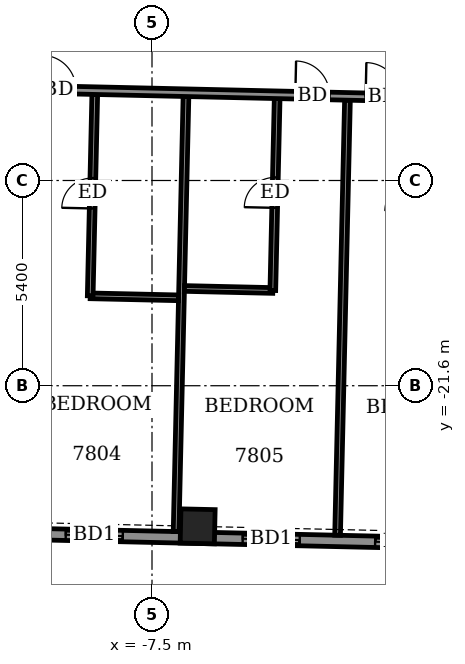
"""IFC4 building model, lengths in metres.
Left out: names, types, materials, properties, quantities, classifications, styles, units other than length and angle.
Written with IfcOpenShell. Run it as: python <this file> out.ifc"""

import sys

from ifc_helpers import new_model, si_unit, direction, frame, frame_2d, origin, origin_2d, place, context, subcontext, project, spatial, rectangle, extrude, element, fill, save


model = new_model("IFC4")
c1 = context("Model", 3, precision=1e-05, world=origin(), true_north=direction((0.0, 1.0)))
c2 = subcontext(c1, "Body", "Model", "MODEL_VIEW")
j1 = project(units=[si_unit("LENGTHUNIT", "METRE"), si_unit("PLANEANGLEUNIT", "RADIAN")], contexts=[c1])
p1 = place(None, origin())
s1 = spatial("IfcSite", under=j1, at=p1, CompositionType="ELEMENT")
p2 = place(p1, origin())
s2 = spatial("IfcBuilding", under=s1, at=p2, CompositionType="ELEMENT")
p3 = place(p2, frame((0.0, 0.0, 306.1)))
s3 = spatial("IfcBuildingStorey", under=s2, at=p3, CompositionType="ELEMENT", Elevation=306.1)
p4 = place(p3, frame((-6.299, -25.3, -0.55), z_axis=(0.0, 0.0, 1.0), x_axis=(0.999743338971, -0.022655157973, 0.0)))
e1 = element("IfcColumn", 1, at=p4, inside=s3, PredefinedType="COLUMN", context=c2, shape_type="SweptSolid", body=[
    extrude(rectangle(XDim=0.9, YDim=0.9, at=origin_2d()), origin(), (0.0, 0.0, 1.0), 3.6),
])
p5 = place(p3, frame((-28.264, -25.102, 0.0), z_axis=(0.0, 0.0, 1.0), x_axis=(0.999742520573, -0.022691244094, 0.0)))
e2 = element("IfcWall", 2, at=p5, inside=s3, PredefinedType="SOLIDWALL", context=c2, shape_type="SweptSolid", body=[
    extrude(rectangle(XDim=51.3, YDim=0.3, at=frame_2d((25.65, 0.0))), origin(), (0.0, 0.0, 1.0), 2.5),
])
p6 = place(p5, frame((1.654, 0.0, 0.0)))
e3 = element("IfcOpeningElement", 3, at=p6, cuts=e2, PredefinedType="OPENING", context=c2, shape_type="SweptSolid", body=[
    extrude(rectangle(XDim=1.5, YDim=2.4, at=frame_2d((0.75, 1.2))), frame((0.0, 0.16, 0.0), z_axis=(0.0, -1.0, 0.0), x_axis=(1.0, 0.0, 0.0)), (0.0, 0.0, 1.0), 0.32),
])
p7 = place(p5, frame((4.936, 0.0, 0.0)))
e4 = element("IfcOpeningElement", 4, at=p7, cuts=e2, PredefinedType="OPENING", context=c2, shape_type="SweptSolid", body=[
    extrude(rectangle(XDim=1.5, YDim=2.4, at=frame_2d((0.75, 1.2))), frame((0.0, 0.16, 0.0), z_axis=(0.0, -1.0, 0.0), x_axis=(1.0, 0.0, 0.0)), (0.0, 0.0, 1.0), 0.32),
])
p8 = place(p5, frame((9.975, 0.0, 0.0)))
e5 = element("IfcOpeningElement", 5, at=p8, cuts=e2, PredefinedType="OPENING", context=c2, shape_type="SweptSolid", body=[
    extrude(rectangle(XDim=1.5, YDim=2.4, at=frame_2d((0.75, 1.2))), frame((0.0, 0.16, 0.0), z_axis=(0.0, -1.0, 0.0), x_axis=(1.0, 0.0, 0.0)), (0.0, 0.0, 1.0), 0.32),
])
p9 = place(p5, frame((15.196, 0.0, 0.0)))
e6 = element("IfcOpeningElement", 6, at=p9, cuts=e2, PredefinedType="OPENING", context=c2, shape_type="SweptSolid", body=[
    extrude(rectangle(XDim=1.5, YDim=2.4, at=frame_2d((0.75, 1.2))), frame((0.0, 0.16, 0.0), z_axis=(0.0, -1.0, 0.0), x_axis=(1.0, 0.0, 0.0)), (0.0, 0.0, 1.0), 0.32),
])
p10 = place(p5, frame((18.5, 0.0, 0.0)))
e7 = element("IfcOpeningElement", 7, at=p10, cuts=e2, PredefinedType="OPENING", context=c2, shape_type="SweptSolid", body=[
    extrude(rectangle(XDim=1.5, YDim=2.4, at=frame_2d((0.75, 1.2))), frame((0.0, 0.16, 0.0), z_axis=(0.0, -1.0, 0.0), x_axis=(1.0, 0.0, 0.0)), (0.0, 0.0, 1.0), 0.32),
])
p11 = place(p5, frame((23.157, 0.0, 0.0)))
e8 = element("IfcOpeningElement", 8, at=p11, cuts=e2, PredefinedType="OPENING", context=c2, shape_type="SweptSolid", body=[
    extrude(rectangle(XDim=1.5, YDim=2.4, at=frame_2d((0.75, 1.2))), frame((0.0, 0.16, 0.0), z_axis=(0.0, -1.0, 0.0), x_axis=(1.0, 0.0, 0.0)), (0.0, 0.0, 1.0), 0.32),
])
p12 = place(p5, frame((26.643, 0.0, 0.0)))
e9 = element("IfcOpeningElement", 9, at=p12, cuts=e2, PredefinedType="OPENING", context=c2, shape_type="SweptSolid", body=[
    extrude(rectangle(XDim=1.5, YDim=2.4, at=frame_2d((0.75, 1.2))), frame((0.0, 0.16, 0.0), z_axis=(0.0, -1.0, 0.0), x_axis=(1.0, 0.0, 0.0)), (0.0, 0.0, 1.0), 0.32),
])
p13 = place(p5, frame((31.275, 0.0, 0.0)))
e10 = element("IfcOpeningElement", 10, at=p13, cuts=e2, PredefinedType="OPENING", context=c2, shape_type="SweptSolid", body=[
    extrude(rectangle(XDim=1.5, YDim=2.4, at=frame_2d((0.75, 1.2))), frame((0.0, 0.16, 0.0), z_axis=(0.0, -1.0, 0.0), x_axis=(1.0, 0.0, 0.0)), (0.0, 0.0, 1.0), 0.32),
])
p14 = place(p5, frame((34.578, 0.0, 0.0)))
e11 = element("IfcOpeningElement", 11, at=p14, cuts=e2, PredefinedType="OPENING", context=c2, shape_type="SweptSolid", body=[
    extrude(rectangle(XDim=1.5, YDim=2.4, at=frame_2d((0.75, 1.2))), frame((0.0, 0.16, 0.0), z_axis=(0.0, -1.0, 0.0), x_axis=(1.0, 0.0, 0.0)), (0.0, 0.0, 1.0), 0.32),
])
p15 = place(p5, frame((39.75, 0.0, 0.0)))
e12 = element("IfcOpeningElement", 12, at=p15, cuts=e2, PredefinedType="OPENING", context=c2, shape_type="SweptSolid", body=[
    extrude(rectangle(XDim=1.5, YDim=2.4, at=frame_2d((0.75, 1.2))), frame((0.0, 0.16, 0.0), z_axis=(0.0, -1.0, 0.0), x_axis=(1.0, 0.0, 0.0)), (0.0, 0.0, 1.0), 0.32),
])
p16 = place(p5, frame((44.839, 0.0, 0.0)))
e13 = element("IfcOpeningElement", 13, at=p16, cuts=e2, PredefinedType="OPENING", context=c2, shape_type="SweptSolid", body=[
    extrude(rectangle(XDim=1.5, YDim=2.4, at=frame_2d((0.75, 1.2))), frame((0.0, 0.16, 0.0), z_axis=(0.0, -1.0, 0.0), x_axis=(1.0, 0.0, 0.0)), (0.0, 0.0, 1.0), 0.32),
])
p17 = place(p5, frame((47.628, 0.0, 0.9)))
e14 = element("IfcOpeningElement", 14, at=p17, cuts=e2, PredefinedType="OPENING", context=c2, shape_type="SweptSolid", body=[
    extrude(rectangle(XDim=2.4, YDim=1.5, at=frame_2d((1.2, 0.75))), frame((0.0, 0.16, 0.0), z_axis=(0.0, -1.0, 0.0), x_axis=(1.0, 0.0, 0.0)), (0.0, 0.0, 1.0), 0.32),
])
p18 = place(p3, frame((-6.866, -25.438, 0.0), z_axis=(0.0, 0.0, 1.0), x_axis=(0.022706391805, 0.999742176649, 0.0)))
e15 = element("IfcWall", 15, at=p18, inside=s3, PredefinedType="PARTITIONING", context=c2, shape_type="SweptSolid", body=[
    extrude(rectangle(XDim=11.451, YDim=0.15, at=frame_2d((5.726, 0.0))), origin(), (0.0, 0.0, 1.0), 2.5),
])
p19 = place(p3, frame((-2.617, -25.534, 0.0), z_axis=(0.0, 0.0, 1.0), x_axis=(0.022708327922, 0.999742132674, 0.0)))
e16 = element("IfcWall", 16, at=p19, inside=s3, PredefinedType="PARTITIONING", context=c2, shape_type="SweptSolid", body=[
    extrude(rectangle(XDim=11.45, YDim=0.15, at=frame_2d((5.725, 0.0))), origin(), (0.0, 0.0, 1.0), 2.5),
])
p20 = place(p3, frame((-9.126, -19.235, 0.0), z_axis=(0.0, 0.0, 1.0), x_axis=(0.999749954681, -0.022361308448, 0.0)))
e17 = element("IfcWall", 17, at=p20, inside=s3, PredefinedType="PARTITIONING", context=c2, shape_type="SweptSolid", body=[
    extrude(rectangle(XDim=2.325, YDim=0.15, at=frame_2d((1.163, 0.0))), origin(), (0.0, 0.0, 1.0), 3.05),
])
p21 = place(p3, frame((-9.126, -19.235, 0.0), z_axis=(0.0, 0.0, 1.0), x_axis=(0.022615729912, 0.999744231672, 0.0)))
e18 = element("IfcWall", 18, at=p21, inside=s3, PredefinedType="PARTITIONING", context=c2, shape_type="SweptSolid", body=[
    extrude(rectangle(XDim=5.301, YDim=0.15, at=frame_2d((2.65, 0.0))), origin(), (0.0, 0.0, 1.0), 3.05),
])
p22 = place(p21, frame((2.3, 0.0, 0.0)))
e19 = element("IfcOpeningElement", 19, at=p22, cuts=e18, PredefinedType="OPENING", context=c2, shape_type="SweptSolid", body=[
    extrude(rectangle(XDim=0.8, YDim=2.1, at=frame_2d((0.4, 1.05))), frame((0.0, 0.085, 0.0), z_axis=(0.0, -1.0, 0.0), x_axis=(1.0, 0.0, 0.0)), (0.0, 0.0, 1.0), 0.17),
])
p23 = place(p3, frame((-6.646, -19.041, 0.0), z_axis=(0.0, 0.0, 1.0), x_axis=(0.999740478815, -0.022781023197, 0.0)))
e20 = element("IfcWall", 20, at=p23, inside=s3, PredefinedType="PARTITIONING", context=c2, shape_type="SweptSolid", body=[
    extrude(rectangle(XDim=2.325, YDim=0.15, at=frame_2d((1.163, 0.0))), origin(), (0.0, 0.0, 1.0), 3.05),
])
p24 = place(p3, frame((-4.321, -19.094, 0.0), z_axis=(0.0, 0.0, 1.0), x_axis=(0.02257535817, 0.999745144126, 0.0)))
e21 = element("IfcWall", 21, at=p24, inside=s3, PredefinedType="PARTITIONING", context=c2, shape_type="SweptSolid", body=[
    extrude(rectangle(XDim=5.05, YDim=0.15, at=frame_2d((2.525, 0.0))), origin(), (0.0, 0.0, 1.0), 3.05),
])
p25 = place(p24, frame((2.175, 0.0, 0.0)))
e22 = element("IfcOpeningElement", 22, at=p25, cuts=e21, PredefinedType="OPENING", context=c2, shape_type="SweptSolid", body=[
    extrude(rectangle(XDim=0.8, YDim=2.1, at=frame_2d((0.4, 1.05))), frame((0.0, 0.085, 0.0), z_axis=(0.0, -1.0, 0.0), x_axis=(1.0, 0.0, 0.0)), (0.0, 0.0, 1.0), 0.17),
])
p26 = place(p3, frame((-31.347, -13.329, 0.0), z_axis=(0.0, 0.0, 1.0), x_axis=(0.999742613079, -0.022687168058, 0.0)))
e23 = element("IfcWall", 23, at=p26, inside=s3, PredefinedType="PARTITIONING", context=c2, shape_type="SweptSolid", body=[
    extrude(rectangle(XDim=58.799, YDim=0.2, at=frame_2d((29.399, 0.0))), origin(), (0.0, 0.0, 1.0), 3.05),
])
p27 = place(p26, frame((1.35, 0.0, 0.0)))
e24 = element("IfcOpeningElement", 24, at=p27, cuts=e23, PredefinedType="OPENING", context=c2, shape_type="SweptSolid", body=[
    extrude(rectangle(XDim=1.0, YDim=2.1, at=frame_2d((0.5, 1.05))), frame((0.0, 0.11, 0.0), z_axis=(0.0, -1.0, 0.0), x_axis=(1.0, 0.0, 0.0)), (0.0, 0.0, 1.0), 0.22),
])
p28 = place(p26, frame((5.95, 0.0, 0.0)))
e25 = element("IfcOpeningElement", 25, at=p28, cuts=e23, PredefinedType="OPENING", context=c2, shape_type="SweptSolid", body=[
    extrude(rectangle(XDim=0.9, YDim=2.1, at=frame_2d((0.45, 1.05))), frame((0.0, 0.11, 0.0), z_axis=(0.0, -1.0, 0.0), x_axis=(1.0, 0.0, 0.0)), (0.0, 0.0, 1.0), 0.22),
])
p29 = place(p26, frame((10.575, 0.0, 0.0)))
e26 = element("IfcOpeningElement", 26, at=p29, cuts=e23, PredefinedType="OPENING", context=c2, shape_type="SweptSolid", body=[
    extrude(rectangle(XDim=0.9, YDim=2.1, at=frame_2d((0.45, 1.05))), frame((0.0, 0.11, 0.0), z_axis=(0.0, -1.0, 0.0), x_axis=(1.0, 0.0, 0.0)), (0.0, 0.0, 1.0), 0.22),
])
p30 = place(p26, frame((12.425, 0.0, 0.0)))
e27 = element("IfcOpeningElement", 27, at=p30, cuts=e23, PredefinedType="OPENING", context=c2, shape_type="SweptSolid", body=[
    extrude(rectangle(XDim=0.9, YDim=2.1, at=frame_2d((0.45, 1.05))), frame((0.0, 0.11, 0.0), z_axis=(0.0, -1.0, 0.0), x_axis=(1.0, 0.0, 0.0)), (0.0, 0.0, 1.0), 0.22),
])
p31 = place(p26, frame((19.075, 0.0, 0.0)))
e28 = element("IfcOpeningElement", 28, at=p31, cuts=e23, PredefinedType="OPENING", context=c2, shape_type="SweptSolid", body=[
    extrude(rectangle(XDim=0.9, YDim=2.1, at=frame_2d((0.45, 1.05))), frame((0.0, 0.11, 0.0), z_axis=(0.0, -1.0, 0.0), x_axis=(1.0, 0.0, 0.0)), (0.0, 0.0, 1.0), 0.22),
])
p32 = place(p26, frame((20.95, 0.0, 0.0)))
e29 = element("IfcOpeningElement", 29, at=p32, cuts=e23, PredefinedType="OPENING", context=c2, shape_type="SweptSolid", body=[
    extrude(rectangle(XDim=0.9, YDim=2.1, at=frame_2d((0.45, 1.05))), frame((0.0, 0.11, 0.0), z_axis=(0.0, -1.0, 0.0), x_axis=(1.0, 0.0, 0.0)), (0.0, 0.0, 1.0), 0.22),
])
p33 = place(p26, frame((27.625, 0.0, 0.0)))
e30 = element("IfcOpeningElement", 30, at=p33, cuts=e23, PredefinedType="OPENING", context=c2, shape_type="SweptSolid", body=[
    extrude(rectangle(XDim=0.9, YDim=2.1, at=frame_2d((0.45, 1.05))), frame((0.0, 0.11, 0.0), z_axis=(0.0, -1.0, 0.0), x_axis=(1.0, 0.0, 0.0)), (0.0, 0.0, 1.0), 0.22),
])
p34 = place(p26, frame((29.475, 0.0, 0.0)))
e31 = element("IfcOpeningElement", 31, at=p34, cuts=e23, PredefinedType="OPENING", context=c2, shape_type="SweptSolid", body=[
    extrude(rectangle(XDim=0.9, YDim=2.1, at=frame_2d((0.45, 1.05))), frame((0.0, 0.11, 0.0), z_axis=(0.0, -1.0, 0.0), x_axis=(1.0, 0.0, 0.0)), (0.0, 0.0, 1.0), 0.22),
])
p35 = place(p26, frame((36.125, 0.0, 0.0)))
e32 = element("IfcOpeningElement", 32, at=p35, cuts=e23, PredefinedType="OPENING", context=c2, shape_type="SweptSolid", body=[
    extrude(rectangle(XDim=0.9, YDim=2.1, at=frame_2d((0.45, 1.05))), frame((0.0, 0.11, 0.0), z_axis=(0.0, -1.0, 0.0), x_axis=(1.0, 0.0, 0.0)), (0.0, 0.0, 1.0), 0.22),
])
p36 = place(p26, frame((37.95, 0.0, 0.0)))
e33 = element("IfcOpeningElement", 33, at=p36, cuts=e23, PredefinedType="OPENING", context=c2, shape_type="SweptSolid", body=[
    extrude(rectangle(XDim=0.9, YDim=2.1, at=frame_2d((0.45, 1.05))), frame((0.0, 0.11, 0.0), z_axis=(0.0, -1.0, 0.0), x_axis=(1.0, 0.0, 0.0)), (0.0, 0.0, 1.0), 0.22),
])
p37 = place(p26, frame((44.6, 0.0, 0.0)))
e34 = element("IfcOpeningElement", 34, at=p37, cuts=e23, PredefinedType="OPENING", context=c2, shape_type="SweptSolid", body=[
    extrude(rectangle(XDim=0.9, YDim=2.1, at=frame_2d((0.45, 1.05))), frame((0.0, 0.11, 0.0), z_axis=(0.0, -1.0, 0.0), x_axis=(1.0, 0.0, 0.0)), (0.0, 0.0, 1.0), 0.22),
])
p38 = place(p26, frame((46.475, 0.0, 0.0)))
e35 = element("IfcOpeningElement", 35, at=p38, cuts=e23, PredefinedType="OPENING", context=c2, shape_type="SweptSolid", body=[
    extrude(rectangle(XDim=0.9, YDim=2.1, at=frame_2d((0.45, 1.05))), frame((0.0, 0.11, 0.0), z_axis=(0.0, -1.0, 0.0), x_axis=(1.0, 0.0, 0.0)), (0.0, 0.0, 1.0), 0.22),
])
p39 = place(p26, frame((55.925, 0.0, 0.0)))
e36 = element("IfcOpeningElement", 36, at=p39, cuts=e23, PredefinedType="OPENING", context=c2, shape_type="SweptSolid", body=[
    extrude(rectangle(XDim=1.0, YDim=2.1, at=frame_2d((0.5, 1.05))), frame((0.0, 0.11, 0.0), z_axis=(0.0, -1.0, 0.0), x_axis=(1.0, 0.0, 0.0)), (0.0, 0.0, 1.0), 0.22),
])
p40 = place(p26, frame((51.0, 0.0, 0.0)))
e37 = element("IfcOpeningElement", 37, at=p40, cuts=e23, PredefinedType="OPENING", context=c2, shape_type="SweptSolid", body=[
    extrude(rectangle(XDim=0.9, YDim=2.1, at=frame_2d((0.45, 1.05))), frame((0.0, 0.11, 0.0), z_axis=(0.0, -1.0, 0.0), x_axis=(1.0, 0.0, 0.0)), (0.0, 0.0, 1.0), 0.22),
])
p41 = place(p10, origin())
e38 = element("IfcDoor", 38, at=p41, inside=s3, OperationType="SLIDING_TO_LEFT", PredefinedType="DOOR", context=c2, shape_type="SweptSolid", body=[
    extrude(rectangle(XDim=1.5, YDim=2.4, at=frame_2d((0.75, 1.2))), frame((0.0, 0.025, 0.0), z_axis=(0.0, -1.0, 0.0), x_axis=(1.0, 0.0, 0.0)), (0.0, 0.0, 1.0), 0.05),
])
fill(e7, e38)
p42 = place(p11, origin())
e39 = element("IfcDoor", 39, at=p42, inside=s3, OperationType="SLIDING_TO_LEFT", PredefinedType="DOOR", context=c2, shape_type="SweptSolid", body=[
    extrude(rectangle(XDim=1.5, YDim=2.4, at=frame_2d((0.75, 1.2))), frame((0.0, 0.025, 0.0), z_axis=(0.0, -1.0, 0.0), x_axis=(1.0, 0.0, 0.0)), (0.0, 0.0, 1.0), 0.05),
])
fill(e8, e39)
p43 = place(p12, origin())
e40 = element("IfcDoor", 40, at=p43, inside=s3, OperationType="SLIDING_TO_LEFT", PredefinedType="DOOR", context=c2, shape_type="SweptSolid", body=[
    extrude(rectangle(XDim=1.5, YDim=2.4, at=frame_2d((0.75, 1.2))), frame((0.0, 0.025, 0.0), z_axis=(0.0, -1.0, 0.0), x_axis=(1.0, 0.0, 0.0)), (0.0, 0.0, 1.0), 0.05),
])
fill(e9, e40)
p44 = place(p32, origin())
e41 = element("IfcDoor", 41, at=p44, inside=s3, OperationType="SINGLE_SWING_RIGHT", PredefinedType="DOOR", context=c2, shape_type="SweptSolid", body=[
    extrude(rectangle(XDim=0.9, YDim=2.1, at=frame_2d((0.45, 1.05))), frame((0.0, 0.025, 0.0), z_axis=(0.0, -1.0, 0.0), x_axis=(1.0, 0.0, 0.0)), (0.0, 0.0, 1.0), 0.05),
])
fill(e29, e41)
p45 = place(p22, origin())
e42 = element("IfcDoor", 42, at=p45, inside=s3, OperationType="SINGLE_SWING_RIGHT", PredefinedType="DOOR", context=c2, shape_type="SweptSolid", body=[
    extrude(rectangle(XDim=0.8, YDim=2.1, at=frame_2d((0.4, 1.05))), frame((0.0, 0.025, 0.0), z_axis=(0.0, -1.0, 0.0), x_axis=(1.0, 0.0, 0.0)), (0.0, 0.0, 1.0), 0.05),
])
fill(e19, e42)
p46 = place(p33, origin())
e43 = element("IfcDoor", 43, at=p46, inside=s3, OperationType="SINGLE_SWING_LEFT", PredefinedType="DOOR", context=c2, shape_type="SweptSolid", body=[
    extrude(rectangle(XDim=0.9, YDim=2.1, at=frame_2d((0.45, 1.05))), frame((0.0, 0.025, 0.0), z_axis=(0.0, -1.0, 0.0), x_axis=(1.0, 0.0, 0.0)), (0.0, 0.0, 1.0), 0.05),
])
fill(e30, e43)
p47 = place(p25, origin())
e44 = element("IfcDoor", 44, at=p47, inside=s3, OperationType="SINGLE_SWING_LEFT", PredefinedType="DOOR", context=c2, shape_type="SweptSolid", body=[
    extrude(rectangle(XDim=0.8, YDim=2.1, at=frame_2d((0.4, 1.05))), frame((0.0, 0.025, 0.0), z_axis=(0.0, -1.0, 0.0), x_axis=(1.0, 0.0, 0.0)), (0.0, 0.0, 1.0), 0.05),
])
fill(e22, e44)
p48 = place(p34, origin())
e45 = element("IfcDoor", 45, at=p48, inside=s3, OperationType="SINGLE_SWING_RIGHT", PredefinedType="DOOR", context=c2, shape_type="SweptSolid", body=[
    extrude(rectangle(XDim=0.9, YDim=2.1, at=frame_2d((0.45, 1.05))), frame((0.0, 0.025, 0.0), z_axis=(0.0, -1.0, 0.0), x_axis=(1.0, 0.0, 0.0)), (0.0, 0.0, 1.0), 0.05),
])
fill(e31, e45)
save(model, sys.argv[1])
